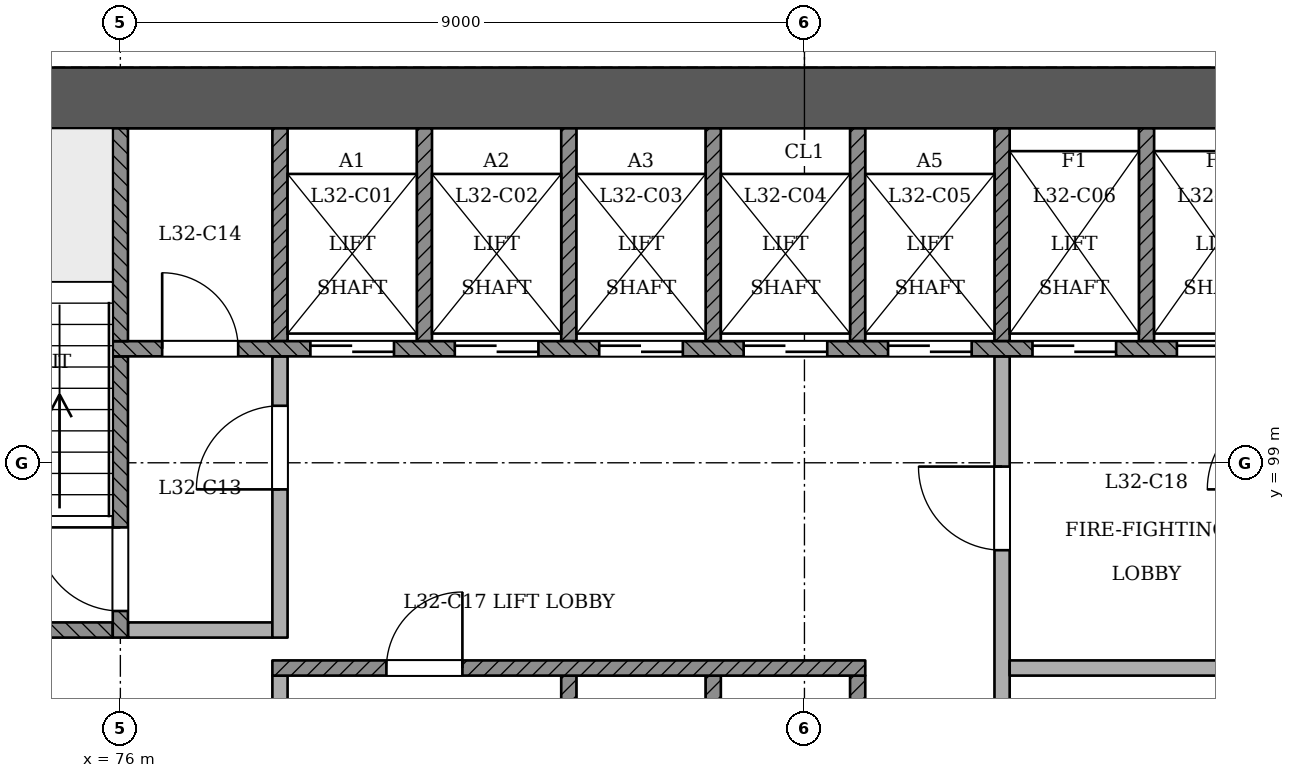
"""IFC4 building model, lengths in metres.
Left out: names, types, materials, properties, quantities, classifications, styles, units other than length and angle.
Written with IfcOpenShell. Run it as: python <this file> out.ifc"""

import sys

from ifc_helpers import new_model, si_unit, direction, frame, frame_2d, origin, place, context, subcontext, project, spatial, rectangle, extrude, element, fill, save


model = new_model("IFC4")
c1 = context("Model", 3, precision=1e-05, world=origin(), true_north=direction((0.0, 1.0)))
c2 = subcontext(c1, "Body", "Model", "MODEL_VIEW")
j1 = project(units=[si_unit("LENGTHUNIT", "METRE"), si_unit("PLANEANGLEUNIT", "RADIAN")], contexts=[c1])
p1 = place(None, origin())
s1 = spatial("IfcSite", under=j1, at=p1, CompositionType="ELEMENT")
p2 = place(p1, origin())
s2 = spatial("IfcBuilding", under=s1, at=p2, CompositionType="ELEMENT")
p3 = place(p2, frame((0.0, 0.0, 127.8)))
s3 = spatial("IfcBuildingStorey", under=s2, at=p3, CompositionType="ELEMENT", Elevation=127.8)
p4 = place(p3, frame((97.4, 103.8, 0.0), z_axis=(0.0, 0.0, 1.0), x_axis=(-1.0, 0.0, 0.0)))
e1 = element("IfcWall", 1, at=p4, inside=s3, PredefinedType="SHEAR", context=c2, shape_type="SweptSolid", body=[
    extrude(rectangle(XDim=25.2, YDim=0.8, at=frame_2d((12.6, 0.0))), origin(), (0.0, 0.0, 1.0), 3.6),
])
p5 = place(p3, frame((64.534, 98.206, 0.0), z_axis=(0.0, 0.0, 1.0), x_axis=(0.499999603446, -0.866025632735, 0.0)))
e2 = element("IfcWall", 2, at=p5, inside=s3, PredefinedType="PARTITIONING", context=c2, shape_type="SweptSolid", body=[
    extrude(rectangle(XDim=40.592, YDim=0.15, at=frame_2d((20.296, 0.0))), origin(), (0.0, 0.0, 1.0), 2.75),
])
p6 = place(p5, frame((0.2, 0.0, 0.0)))
e3 = element("IfcOpeningElement", 3, at=p6, cuts=e2, PredefinedType="OPENING", context=c2, shape_type="SweptSolid", body=[
    extrude(rectangle(XDim=1.2, YDim=2.1, at=frame_2d((0.6, 1.05))), frame((0.0, 0.085, 0.0), z_axis=(0.0, -1.0, 0.0), x_axis=(1.0, 0.0, 0.0)), (0.0, 0.0, 1.0), 0.171),
])
p7 = place(p5, frame((3.016, 0.0, 0.0)))
e4 = element("IfcOpeningElement", 4, at=p7, cuts=e2, PredefinedType="OPENING", context=c2, shape_type="SweptSolid", body=[
    extrude(rectangle(XDim=1.0, YDim=2.1, at=frame_2d((0.5, 1.05))), frame((0.0, 0.085, 0.0), z_axis=(0.0, -1.0, 0.0), x_axis=(1.0, 0.0, 0.0)), (0.0, 0.0, 1.0), 0.171),
])
p8 = place(p5, frame((9.691, 0.0, 0.0)))
e5 = element("IfcOpeningElement", 5, at=p8, cuts=e2, PredefinedType="OPENING", context=c2, shape_type="SweptSolid", body=[
    extrude(rectangle(XDim=1.0, YDim=2.1, at=frame_2d((0.5, 1.05))), frame((0.0, 0.085, 0.0), z_axis=(0.0, -1.0, 0.0), x_axis=(1.0, 0.0, 0.0)), (0.0, 0.0, 1.0), 0.171),
])
p9 = place(p5, frame((11.901, 0.0, 0.0)))
e6 = element("IfcOpeningElement", 6, at=p9, cuts=e2, PredefinedType="OPENING", context=c2, shape_type="SweptSolid", body=[
    extrude(rectangle(XDim=1.0, YDim=2.1, at=frame_2d((0.5, 1.05))), frame((0.0, 0.085, 0.0), z_axis=(0.0, -1.0, 0.0), x_axis=(1.0, 0.0, 0.0)), (0.0, 0.0, 1.0), 0.171),
])
p10 = place(p5, frame((18.576, 0.0, 0.0)))
e7 = element("IfcOpeningElement", 7, at=p10, cuts=e2, PredefinedType="OPENING", context=c2, shape_type="SweptSolid", body=[
    extrude(rectangle(XDim=1.0, YDim=2.1, at=frame_2d((0.5, 1.05))), frame((0.0, 0.085, 0.0), z_axis=(0.0, -1.0, 0.0), x_axis=(1.0, 0.0, 0.0)), (0.0, 0.0, 1.0), 0.171),
])
p11 = place(p5, frame((22.046, 0.0, 0.0)))
e8 = element("IfcOpeningElement", 8, at=p11, cuts=e2, PredefinedType="OPENING", context=c2, shape_type="SweptSolid", body=[
    extrude(rectangle(XDim=1.0, YDim=2.1, at=frame_2d((0.5, 1.05))), frame((0.0, 0.085, 0.0), z_axis=(0.0, -1.0, 0.0), x_axis=(1.0, 0.0, 0.0)), (0.0, 0.0, 1.0), 0.171),
])
p12 = place(p5, frame((27.576, 0.0, 0.0)))
e9 = element("IfcOpeningElement", 9, at=p12, cuts=e2, PredefinedType="OPENING", context=c2, shape_type="SweptSolid", body=[
    extrude(rectangle(XDim=1.0, YDim=2.1, at=frame_2d((0.5, 1.05))), frame((0.0, 0.085, 0.0), z_axis=(0.0, -1.0, 0.0), x_axis=(1.0, 0.0, 0.0)), (0.0, 0.0, 1.0), 0.171),
])
p13 = place(p5, frame((31.046, 0.0, 0.0)))
e10 = element("IfcOpeningElement", 10, at=p13, cuts=e2, PredefinedType="OPENING", context=c2, shape_type="SweptSolid", body=[
    extrude(rectangle(XDim=1.0, YDim=2.1, at=frame_2d((0.5, 1.05))), frame((0.0, 0.085, 0.0), z_axis=(0.0, -1.0, 0.0), x_axis=(1.0, 0.0, 0.0)), (0.0, 0.0, 1.0), 0.171),
])
p14 = place(p5, frame((36.576, 0.0, 0.0)))
e11 = element("IfcOpeningElement", 11, at=p14, cuts=e2, PredefinedType="OPENING", context=c2, shape_type="SweptSolid", body=[
    extrude(rectangle(XDim=1.0, YDim=2.1, at=frame_2d((0.5, 1.05))), frame((0.0, 0.085, 0.0), z_axis=(0.0, -1.0, 0.0), x_axis=(1.0, 0.0, 0.0)), (0.0, 0.0, 1.0), 0.171),
])
p15 = place(p5, frame((39.323, 0.0, 0.0)))
e12 = element("IfcOpeningElement", 12, at=p15, cuts=e2, PredefinedType="OPENING", context=c2, shape_type="SweptSolid", body=[
    extrude(rectangle(XDim=1.0, YDim=2.1, at=frame_2d((0.5, 1.05))), frame((0.0, 0.085, 0.0), z_axis=(0.0, -1.0, 0.0), x_axis=(1.0, 0.0, 0.0)), (0.0, 0.0, 1.0), 0.171),
])
p16 = place(p3, frame((85.17, 63.052, 0.0), z_axis=(0.0, 0.0, 1.0), x_axis=(0.499999603446, 0.866025632735, 0.0)))
e13 = element("IfcWall", 13, at=p16, inside=s3, PredefinedType="PARTITIONING", context=c2, shape_type="SweptSolid", body=[
    extrude(rectangle(XDim=40.592, YDim=0.15, at=frame_2d((20.296, 0.0))), origin(), (0.0, 0.0, 1.0), 2.75),
])
p17 = place(p16, frame((0.273, 0.0, 0.0)))
e14 = element("IfcOpeningElement", 14, at=p17, cuts=e13, PredefinedType="OPENING", context=c2, shape_type="SweptSolid", body=[
    extrude(rectangle(XDim=1.2, YDim=2.1, at=frame_2d((0.6, 1.05))), frame((0.0, 0.085, 0.0), z_axis=(0.0, -1.0, 0.0), x_axis=(1.0, 0.0, 0.0)), (0.0, 0.0, 1.0), 0.171),
])
p18 = place(p16, frame((4.046, 0.0, 0.0)))
e15 = element("IfcOpeningElement", 15, at=p18, cuts=e13, PredefinedType="OPENING", context=c2, shape_type="SweptSolid", body=[
    extrude(rectangle(XDim=1.0, YDim=2.1, at=frame_2d((0.5, 1.05))), frame((0.0, 0.085, 0.0), z_axis=(0.0, -1.0, 0.0), x_axis=(1.0, 0.0, 0.0)), (0.0, 0.0, 1.0), 0.171),
])
p19 = place(p16, frame((9.576, 0.0, 0.0)))
e16 = element("IfcOpeningElement", 16, at=p19, cuts=e13, PredefinedType="OPENING", context=c2, shape_type="SweptSolid", body=[
    extrude(rectangle(XDim=1.0, YDim=2.1, at=frame_2d((0.5, 1.05))), frame((0.0, 0.085, 0.0), z_axis=(0.0, -1.0, 0.0), x_axis=(1.0, 0.0, 0.0)), (0.0, 0.0, 1.0), 0.171),
])
p20 = place(p16, frame((11.901, 0.0, 0.0)))
e17 = element("IfcOpeningElement", 17, at=p20, cuts=e13, PredefinedType="OPENING", context=c2, shape_type="SweptSolid", body=[
    extrude(rectangle(XDim=1.0, YDim=2.1, at=frame_2d((0.5, 1.05))), frame((0.0, 0.085, 0.0), z_axis=(0.0, -1.0, 0.0), x_axis=(1.0, 0.0, 0.0)), (0.0, 0.0, 1.0), 0.171),
])
p21 = place(p16, frame((18.691, 0.0, 0.0)))
e18 = element("IfcOpeningElement", 18, at=p21, cuts=e13, PredefinedType="OPENING", context=c2, shape_type="SweptSolid", body=[
    extrude(rectangle(XDim=1.0, YDim=2.1, at=frame_2d((0.5, 1.05))), frame((0.0, 0.085, 0.0), z_axis=(0.0, -1.0, 0.0), x_axis=(1.0, 0.0, 0.0)), (0.0, 0.0, 1.0), 0.171),
])
p22 = place(p16, frame((21.016, 0.0, 0.0)))
e19 = element("IfcOpeningElement", 19, at=p22, cuts=e13, PredefinedType="OPENING", context=c2, shape_type="SweptSolid", body=[
    extrude(rectangle(XDim=1.0, YDim=2.1, at=frame_2d((0.5, 1.05))), frame((0.0, 0.085, 0.0), z_axis=(0.0, -1.0, 0.0), x_axis=(1.0, 0.0, 0.0)), (0.0, 0.0, 1.0), 0.171),
])
p23 = place(p16, frame((27.576, 0.0, 0.0)))
e20 = element("IfcOpeningElement", 20, at=p23, cuts=e13, PredefinedType="OPENING", context=c2, shape_type="SweptSolid", body=[
    extrude(rectangle(XDim=1.0, YDim=2.1, at=frame_2d((0.5, 1.05))), frame((0.0, 0.085, 0.0), z_axis=(0.0, -1.0, 0.0), x_axis=(1.0, 0.0, 0.0)), (0.0, 0.0, 1.0), 0.171),
])
p24 = place(p16, frame((30.016, 0.0, 0.0)))
e21 = element("IfcOpeningElement", 21, at=p24, cuts=e13, PredefinedType="OPENING", context=c2, shape_type="SweptSolid", body=[
    extrude(rectangle(XDim=1.0, YDim=2.1, at=frame_2d((0.5, 1.05))), frame((0.0, 0.085, 0.0), z_axis=(0.0, -1.0, 0.0), x_axis=(1.0, 0.0, 0.0)), (0.0, 0.0, 1.0), 0.171),
])
p25 = place(p16, frame((39.192, 0.0, 0.0)))
e22 = element("IfcOpeningElement", 22, at=p25, cuts=e13, PredefinedType="OPENING", context=c2, shape_type="SweptSolid", body=[
    extrude(rectangle(XDim=1.2, YDim=2.1, at=frame_2d((0.6, 1.05))), frame((0.0, 0.085, 0.0), z_axis=(0.0, -1.0, 0.0), x_axis=(1.0, 0.0, 0.0)), (0.0, 0.0, 1.0), 0.171),
])
p26 = place(p3, frame((78.1, 93.4, 0.0), z_axis=(0.0, 0.0, 1.0), x_axis=(0.0, 1.0, 0.0)))
e23 = element("IfcWall", 23, at=p26, inside=s3, PredefinedType="PARTITIONING", context=c2, shape_type="SweptSolid", body=[
    extrude(rectangle(XDim=2.8, YDim=0.2, at=frame_2d((1.4, 0.0))), origin(), (0.0, 0.0, 1.0), 3.15),
])
for number, where, z_axis, x_axis in (
    (24, (81.9, 93.4, 0.0), (0.0, 0.0, 1.0), (0.0, 1.0, 0.0)),
    (25, (83.8, 93.4, 0.0), (0.0, 0.0, 1.0), (0.0, 1.0, 0.0)),
    (26, (85.7, 93.4, 0.0), (0.0, 0.0, 1.0), (0.0, 1.0, 0.0)),
):
    element("IfcWall", number, at=place(p3, frame(where, z_axis=z_axis, x_axis=x_axis)), inside=s3, PredefinedType="SOLIDWALL", context=c2, shape_type="SweptSolid", body=[
        extrude(rectangle(XDim=2.8, YDim=0.2, at=frame_2d((1.4, 0.0))), origin(), (0.0, 0.0, 1.0), 3.15),
    ])
p27 = place(p3, frame((87.6, 93.4, 0.0), z_axis=(0.0, 0.0, 1.0), x_axis=(0.0, 1.0, 0.0)))
e27 = element("IfcWall", 27, at=p27, inside=s3, PredefinedType="PARTITIONING", context=c2, shape_type="SweptSolid", body=[
    extrude(rectangle(XDim=7.0, YDim=0.2, at=frame_2d((3.5, 0.0))), origin(), (0.0, 0.0, 1.0), 3.15),
])
p28 = place(p27, frame((4.45, 0.0, 0.0)))
e28 = element("IfcOpeningElement", 28, at=p28, cuts=e27, PredefinedType="OPENING", context=c2, shape_type="SweptSolid", body=[
    extrude(rectangle(XDim=1.1, YDim=2.1, at=frame_2d((0.55, 1.05))), frame((0.0, 0.11, 0.0), z_axis=(0.0, -1.0, 0.0), x_axis=(1.0, 0.0, 0.0)), (0.0, 0.0, 1.0), 0.221),
])
p29 = place(p3, frame((78.0, 96.3, 0.0), z_axis=(0.0, 0.0, 1.0), x_axis=(1.0, 0.0, 0.0)))
e29 = element("IfcWall", 29, at=p29, inside=s3, PredefinedType="SOLIDWALL", context=c2, shape_type="SweptSolid", body=[
    extrude(rectangle(XDim=7.8, YDim=0.2, at=frame_2d((3.9, 0.0))), origin(), (0.0, 0.0, 1.0), 3.15),
])
p30 = place(p29, frame((1.5, 0.0, 0.0)))
e30 = element("IfcOpeningElement", 30, at=p30, cuts=e29, PredefinedType="OPENING", context=c2, shape_type="SweptSolid", body=[
    extrude(rectangle(XDim=1.0, YDim=2.1, at=frame_2d((0.5, 1.05))), frame((0.0, 0.11, 0.0), z_axis=(0.0, -1.0, 0.0), x_axis=(1.0, 0.0, 0.0)), (0.0, 0.0, 1.0), 0.221),
])
p31 = place(p3, frame((87.7, 96.3, 0.0), z_axis=(0.0, 0.0, 1.0), x_axis=(1.0, 0.0, 0.0)))
e31 = element("IfcWall", 31, at=p31, inside=s3, PredefinedType="PARTITIONING", context=c2, shape_type="SweptSolid", body=[
    extrude(rectangle(XDim=3.6, YDim=0.2, at=frame_2d((1.8, 0.0))), origin(), (0.0, 0.0, 1.0), 3.15),
])
p32 = place(p3, frame((73.0, 96.8, 0.0), z_axis=(0.0, 0.0, 1.0), x_axis=(1.0, 0.0, 0.0)))
e32 = element("IfcWall", 32, at=p32, inside=s3, PredefinedType="SOLIDWALL", context=c2, shape_type="SweptSolid", body=[
    extrude(rectangle(XDim=2.9, YDim=0.2, at=frame_2d((1.45, 0.0))), origin(), (0.0, 0.0, 1.0), 3.15),
])
p33 = place(p3, frame((76.0, 96.7, 0.0), z_axis=(0.0, 0.0, 1.0), x_axis=(0.0, 1.0, 0.0)))
e33 = element("IfcWall", 33, at=p33, inside=s3, PredefinedType="SOLIDWALL", context=c2, shape_type="SweptSolid", body=[
    extrude(rectangle(XDim=3.7, YDim=0.2, at=frame_2d((1.85, 0.0))), origin(), (0.0, 0.0, 1.0), 3.15),
])
p34 = place(p33, frame((0.35, 0.0, 0.0)))
e34 = element("IfcOpeningElement", 34, at=p34, cuts=e33, PredefinedType="OPENING", context=c2, shape_type="SweptSolid", body=[
    extrude(rectangle(XDim=1.1, YDim=2.1, at=frame_2d((0.55, 1.05))), frame((0.0, 0.11, 0.0), z_axis=(0.0, -1.0, 0.0), x_axis=(1.0, 0.0, 0.0)), (0.0, 0.0, 1.0), 0.221),
])
p35 = place(p3, frame((76.1, 96.8, 0.0), z_axis=(0.0, 0.0, 1.0), x_axis=(1.0, 0.0, 0.0)))
e35 = element("IfcWall", 35, at=p35, inside=s3, PredefinedType="PARTITIONING", context=c2, shape_type="SweptSolid", body=[
    extrude(rectangle(XDim=1.9, YDim=0.2, at=frame_2d((0.95, 0.0))), origin(), (0.0, 0.0, 1.0), 3.15),
])
p36 = place(p3, frame((78.1, 96.7, 0.0), z_axis=(0.0, 0.0, 1.0), x_axis=(0.0, 1.0, 0.0)))
e36 = element("IfcWall", 36, at=p36, inside=s3, PredefinedType="PARTITIONING", context=c2, shape_type="SweptSolid", body=[
    extrude(rectangle(XDim=3.7, YDim=0.2, at=frame_2d((1.85, 0.0))), origin(), (0.0, 0.0, 1.0), 3.15),
])
p37 = place(p36, frame((1.95, 0.0, 0.0)))
e37 = element("IfcOpeningElement", 37, at=p37, cuts=e36, PredefinedType="OPENING", context=c2, shape_type="SweptSolid", body=[
    extrude(rectangle(XDim=1.1, YDim=2.1, at=frame_2d((0.55, 1.05))), frame((0.0, 0.11, 0.0), z_axis=(0.0, -1.0, 0.0), x_axis=(1.0, 0.0, 0.0)), (0.0, 0.0, 1.0), 0.221),
])
p38 = place(p3, frame((75.9, 100.5, 0.0), z_axis=(0.0, 0.0, 1.0), x_axis=(1.0, 0.0, 0.0)))
e38 = element("IfcWall", 38, at=p38, inside=s3, PredefinedType="SOLIDWALL", context=c2, shape_type="SweptSolid", body=[
    extrude(rectangle(XDim=18.2, YDim=0.2, at=frame_2d((9.1, 0.0))), origin(), (0.0, 0.0, 1.0), 3.15),
])
p39 = place(p38, frame((2.6, 0.0, 0.0)))
e39 = element("IfcOpeningElement", 39, at=p39, cuts=e38, PredefinedType="OPENING", context=c2, shape_type="SweptSolid", body=[
    extrude(rectangle(XDim=1.1, YDim=2.1, at=frame_2d((0.55, 1.05))), frame((0.0, 0.11, 0.0), z_axis=(0.0, -1.0, 0.0), x_axis=(1.0, 0.0, 0.0)), (0.0, 0.0, 1.0), 0.221),
])
p40 = place(p38, frame((4.5, 0.0, 0.0)))
e40 = element("IfcOpeningElement", 40, at=p40, cuts=e38, PredefinedType="OPENING", context=c2, shape_type="SweptSolid", body=[
    extrude(rectangle(XDim=1.1, YDim=2.1, at=frame_2d((0.55, 1.05))), frame((0.0, 0.11, 0.0), z_axis=(0.0, -1.0, 0.0), x_axis=(1.0, 0.0, 0.0)), (0.0, 0.0, 1.0), 0.221),
])
p41 = place(p38, frame((6.4, 0.0, 0.0)))
e41 = element("IfcOpeningElement", 41, at=p41, cuts=e38, PredefinedType="OPENING", context=c2, shape_type="SweptSolid", body=[
    extrude(rectangle(XDim=1.1, YDim=2.1, at=frame_2d((0.55, 1.05))), frame((0.0, 0.11, 0.0), z_axis=(0.0, -1.0, 0.0), x_axis=(1.0, 0.0, 0.0)), (0.0, 0.0, 1.0), 0.221),
])
p42 = place(p38, frame((8.3, 0.0, 0.0)))
e42 = element("IfcOpeningElement", 42, at=p42, cuts=e38, PredefinedType="OPENING", context=c2, shape_type="SweptSolid", body=[
    extrude(rectangle(XDim=1.1, YDim=2.1, at=frame_2d((0.55, 1.05))), frame((0.0, 0.11, 0.0), z_axis=(0.0, -1.0, 0.0), x_axis=(1.0, 0.0, 0.0)), (0.0, 0.0, 1.0), 0.221),
])
p43 = place(p38, frame((10.2, 0.0, 0.0)))
e43 = element("IfcOpeningElement", 43, at=p43, cuts=e38, PredefinedType="OPENING", context=c2, shape_type="SweptSolid", body=[
    extrude(rectangle(XDim=1.1, YDim=2.1, at=frame_2d((0.55, 1.05))), frame((0.0, 0.11, 0.0), z_axis=(0.0, -1.0, 0.0), x_axis=(1.0, 0.0, 0.0)), (0.0, 0.0, 1.0), 0.221),
])
p44 = place(p38, frame((12.1, 0.0, 0.0)))
e44 = element("IfcOpeningElement", 44, at=p44, cuts=e38, PredefinedType="OPENING", context=c2, shape_type="SweptSolid", body=[
    extrude(rectangle(XDim=1.1, YDim=2.1, at=frame_2d((0.55, 1.05))), frame((0.0, 0.11, 0.0), z_axis=(0.0, -1.0, 0.0), x_axis=(1.0, 0.0, 0.0)), (0.0, 0.0, 1.0), 0.221),
])
p45 = place(p38, frame((14.0, 0.0, 0.0)))
e45 = element("IfcOpeningElement", 45, at=p45, cuts=e38, PredefinedType="OPENING", context=c2, shape_type="SweptSolid", body=[
    extrude(rectangle(XDim=1.1, YDim=2.1, at=frame_2d((0.55, 1.05))), frame((0.0, 0.11, 0.0), z_axis=(0.0, -1.0, 0.0), x_axis=(1.0, 0.0, 0.0)), (0.0, 0.0, 1.0), 0.221),
])
p46 = place(p38, frame((0.65, 0.0, 0.0)))
e46 = element("IfcOpeningElement", 46, at=p46, cuts=e38, PredefinedType="OPENING", context=c2, shape_type="SweptSolid", body=[
    extrude(rectangle(XDim=1.0, YDim=2.1, at=frame_2d((0.5, 1.05))), frame((0.0, 0.11, 0.0), z_axis=(0.0, -1.0, 0.0), x_axis=(1.0, 0.0, 0.0)), (0.0, 0.0, 1.0), 0.221),
])
p47 = place(p38, frame((16.3, 0.0, 0.0)))
e47 = element("IfcOpeningElement", 47, at=p47, cuts=e38, PredefinedType="OPENING", context=c2, shape_type="SweptSolid", body=[
    extrude(rectangle(XDim=1.0, YDim=2.1, at=frame_2d((0.5, 1.05))), frame((0.0, 0.11, 0.0), z_axis=(0.0, -1.0, 0.0), x_axis=(1.0, 0.0, 0.0)), (0.0, 0.0, 1.0), 0.221),
])
for number, where, z_axis, x_axis in (
    (48, (76.0, 100.6, 0.0), (0.0, 0.0, 1.0), (0.0, 1.0, 0.0)),
    (49, (78.1, 100.6, 0.0), (0.0, 0.0, 1.0), (0.0, 1.0, 0.0)),
    (50, (80.0, 100.6, 0.0), (0.0, 0.0, 1.0), (0.0, 1.0, 0.0)),
    (51, (81.9, 100.6, 0.0), (0.0, 0.0, 1.0), (0.0, 1.0, 0.0)),
    (52, (83.8, 100.6, 0.0), (0.0, 0.0, 1.0), (0.0, 1.0, 0.0)),
    (53, (85.7, 100.6, 0.0), (0.0, 0.0, 1.0), (0.0, 1.0, 0.0)),
    (54, (87.6, 100.6, 0.0), (0.0, 0.0, 1.0), (0.0, 1.0, 0.0)),
    (55, (89.5, 100.6, 0.0), (0.0, 0.0, 1.0), (0.0, 1.0, 0.0)),
):
    element("IfcWall", number, at=place(p3, frame(where, z_axis=z_axis, x_axis=x_axis)), inside=s3, PredefinedType="SOLIDWALL", context=c2, shape_type="SweptSolid", body=[
        extrude(rectangle(XDim=2.8, YDim=0.2, at=frame_2d((1.4, 0.0))), origin(), (0.0, 0.0, 1.0), 3.15),
    ])
p48 = place(p39, origin())
e56 = element("IfcDoor", 56, at=p48, inside=s3, OperationType="SLIDING_TO_RIGHT", PredefinedType="NOTDEFINED", context=c2, shape_type="SweptSolid", body=[
    extrude(rectangle(XDim=1.1, YDim=2.1, at=frame_2d((0.55, 1.05))), frame((0.0, 0.025, 0.0), z_axis=(0.0, -1.0, 0.0), x_axis=(1.0, 0.0, 0.0)), (0.0, 0.0, 1.0), 0.05),
])
fill(e39, e56)
p49 = place(p40, origin())
e57 = element("IfcDoor", 57, at=p49, inside=s3, OperationType="SLIDING_TO_LEFT", PredefinedType="NOTDEFINED", context=c2, shape_type="SweptSolid", body=[
    extrude(rectangle(XDim=1.1, YDim=2.1, at=frame_2d((0.55, 1.05))), frame((0.0, 0.025, 0.0), z_axis=(0.0, -1.0, 0.0), x_axis=(1.0, 0.0, 0.0)), (0.0, 0.0, 1.0), 0.05),
])
fill(e40, e57)
p50 = place(p41, origin())
e58 = element("IfcDoor", 58, at=p50, inside=s3, OperationType="SLIDING_TO_RIGHT", PredefinedType="NOTDEFINED", context=c2, shape_type="SweptSolid", body=[
    extrude(rectangle(XDim=1.1, YDim=2.1, at=frame_2d((0.55, 1.05))), frame((0.0, 0.025, 0.0), z_axis=(0.0, -1.0, 0.0), x_axis=(1.0, 0.0, 0.0)), (0.0, 0.0, 1.0), 0.05),
])
fill(e41, e58)
p51 = place(p42, origin())
e59 = element("IfcDoor", 59, at=p51, inside=s3, OperationType="SLIDING_TO_LEFT", PredefinedType="NOTDEFINED", context=c2, shape_type="SweptSolid", body=[
    extrude(rectangle(XDim=1.1, YDim=2.1, at=frame_2d((0.55, 1.05))), frame((0.0, 0.025, 0.0), z_axis=(0.0, -1.0, 0.0), x_axis=(1.0, 0.0, 0.0)), (0.0, 0.0, 1.0), 0.05),
])
fill(e42, e59)
p52 = place(p43, origin())
e60 = element("IfcDoor", 60, at=p52, inside=s3, OperationType="SLIDING_TO_RIGHT", PredefinedType="NOTDEFINED", context=c2, shape_type="SweptSolid", body=[
    extrude(rectangle(XDim=1.1, YDim=2.1, at=frame_2d((0.55, 1.05))), frame((0.0, 0.025, 0.0), z_axis=(0.0, -1.0, 0.0), x_axis=(1.0, 0.0, 0.0)), (0.0, 0.0, 1.0), 0.05),
])
fill(e43, e60)
p53 = place(p44, origin())
e61 = element("IfcDoor", 61, at=p53, inside=s3, OperationType="SLIDING_TO_RIGHT", PredefinedType="NOTDEFINED", context=c2, shape_type="SweptSolid", body=[
    extrude(rectangle(XDim=1.1, YDim=2.1, at=frame_2d((0.55, 1.05))), frame((0.0, 0.025, 0.0), z_axis=(0.0, -1.0, 0.0), x_axis=(1.0, 0.0, 0.0)), (0.0, 0.0, 1.0), 0.05),
])
fill(e44, e61)
p54 = place(p45, origin())
e62 = element("IfcDoor", 62, at=p54, inside=s3, OperationType="SLIDING_TO_LEFT", PredefinedType="NOTDEFINED", context=c2, shape_type="SweptSolid", body=[
    extrude(rectangle(XDim=1.1, YDim=2.1, at=frame_2d((0.55, 1.05))), frame((0.0, 0.025, 0.0), z_axis=(0.0, -1.0, 0.0), x_axis=(1.0, 0.0, 0.0)), (0.0, 0.0, 1.0), 0.05),
])
fill(e45, e62)
p55 = place(p34, origin())
e63 = element("IfcDoor", 63, at=p55, inside=s3, OperationType="SINGLE_SWING_RIGHT", PredefinedType="NOTDEFINED", context=c2, shape_type="SweptSolid", body=[
    extrude(rectangle(XDim=1.1, YDim=2.1, at=frame_2d((0.55, 1.05))), frame((0.0, 0.025, 0.0), z_axis=(0.0, -1.0, 0.0), x_axis=(1.0, 0.0, 0.0)), (0.0, 0.0, 1.0), 0.05),
])
fill(e34, e63)
p56 = place(p37, origin())
e64 = element("IfcDoor", 64, at=p56, inside=s3, OperationType="SINGLE_SWING_LEFT", PredefinedType="NOTDEFINED", context=c2, shape_type="SweptSolid", body=[
    extrude(rectangle(XDim=1.1, YDim=2.1, at=frame_2d((0.55, 1.05))), frame((0.0, 0.025, 0.0), z_axis=(0.0, -1.0, 0.0), x_axis=(1.0, 0.0, 0.0)), (0.0, 0.0, 1.0), 0.05),
])
fill(e37, e64)
p57 = place(p28, origin())
e65 = element("IfcDoor", 65, at=p57, inside=s3, OperationType="SINGLE_SWING_RIGHT", PredefinedType="NOTDEFINED", context=c2, shape_type="SweptSolid", body=[
    extrude(rectangle(XDim=1.1, YDim=2.1, at=frame_2d((0.55, 1.05))), frame((0.0, 0.025, 0.0), z_axis=(0.0, -1.0, 0.0), x_axis=(1.0, 0.0, 0.0)), (0.0, 0.0, 1.0), 0.05),
])
fill(e28, e65)
p58 = place(p46, origin())
e66 = element("IfcDoor", 66, at=p58, inside=s3, OperationType="SINGLE_SWING_LEFT", PredefinedType="NOTDEFINED", context=c2, shape_type="SweptSolid", body=[
    extrude(rectangle(XDim=1.0, YDim=2.1, at=frame_2d((0.5, 1.05))), frame((0.0, 0.025, 0.0), z_axis=(0.0, -1.0, 0.0), x_axis=(1.0, 0.0, 0.0)), (0.0, 0.0, 1.0), 0.05),
])
fill(e46, e66)
p59 = place(p30, origin())
e67 = element("IfcDoor", 67, at=p59, inside=s3, OperationType="SINGLE_SWING_RIGHT", PredefinedType="NOTDEFINED", context=c2, shape_type="SweptSolid", body=[
    extrude(rectangle(XDim=1.0, YDim=2.1, at=frame_2d((0.5, 1.05))), frame((0.0, 0.025, 0.0), z_axis=(0.0, -1.0, 0.0), x_axis=(1.0, 0.0, 0.0)), (0.0, 0.0, 1.0), 0.05),
])
fill(e30, e67)
save(model, sys.argv[1])
